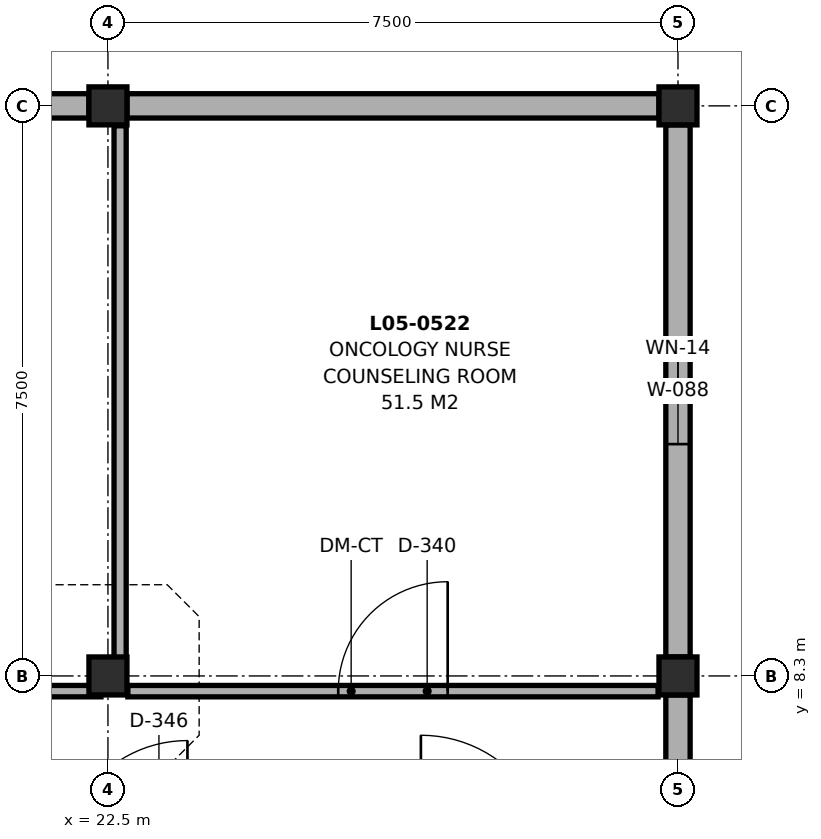
"""IFC4 building model, lengths in metres.
Left out: names, types, materials, properties, quantities, classifications, styles, units other than length and angle.
Written with IfcOpenShell. Run it as: python <this file> out.ifc"""

import sys

from ifc_helpers import new_model, si_unit, direction, frame, frame_2d, origin, origin_2d, place, context, subcontext, project, spatial, rectangle, extrude, element, fill, save


model = new_model("IFC4")
c1 = context("Model", 3, precision=1e-05, world=origin(), true_north=direction((0.0, 1.0)))
c2 = subcontext(c1, "Body", "Model", "MODEL_VIEW")
j1 = project(units=[si_unit("LENGTHUNIT", "METRE"), si_unit("PLANEANGLEUNIT", "RADIAN")], contexts=[c1])
p1 = place(None, origin())
s1 = spatial("IfcSite", under=j1, at=p1, CompositionType="ELEMENT")
p2 = place(p1, origin())
s2 = spatial("IfcBuilding", under=s1, at=p2, CompositionType="ELEMENT")
p3 = place(p2, frame((0.0, 0.0, 21.5)))
s3 = spatial("IfcBuildingStorey", under=s2, at=p3, CompositionType="ELEMENT", Elevation=21.5)
for number, where, z_axis, x_axis in (
    (1, (22.5, 8.3, 0.0), (0.0, 0.0, 1.0), (1.0, 0.0, 0.0)),
    (2, (22.5, 15.8, 0.0), (0.0, 0.0, 1.0), (1.0, 0.0, 0.0)),
):
    element("IfcColumn", number, at=place(p3, frame(where, z_axis=z_axis, x_axis=x_axis)), inside=s3, PredefinedType="COLUMN", context=c2, shape_type="SweptSolid", body=[
        extrude(rectangle(XDim=0.5, YDim=0.5, at=origin_2d()), origin(), (0.0, 0.0, 1.0), 4.58),
    ])
for number, where, z_axis, x_axis in (
    (3, (30.0, 8.3, 0.0), (0.0, 0.0, 1.0), (1.0, 0.0, 0.0)),
    (4, (30.0, 15.8, 0.0), (0.0, 0.0, 1.0), (1.0, 0.0, 0.0)),
):
    element("IfcColumn", number, at=place(p3, frame(where, z_axis=z_axis, x_axis=x_axis)), inside=s3, PredefinedType="COLUMN", context=c2, shape_type="SweptSolid", body=[
        extrude(rectangle(XDim=0.5, YDim=0.5, at=origin_2d()), origin(), (0.0, 0.0, 1.0), 4.83),
    ])
for number, where, z_axis, x_axis in (
    (5, (15.25, 15.8, 0.0), (0.0, 0.0, 1.0), (1.0, 0.0, 0.0)),
    (6, (22.75, 15.8, 0.0), (0.0, 0.0, 1.0), (1.0, 0.0, 0.0)),
):
    element("IfcWall", number, at=place(p3, frame(where, z_axis=z_axis, x_axis=x_axis)), inside=s3, PredefinedType="SOLIDWALL", context=c2, shape_type="SweptSolid", body=[
        extrude(rectangle(XDim=7.0, YDim=0.32, at=frame_2d((3.5, 0.0))), origin(), (0.0, 0.0, 1.0), 3.7),
    ])
p4 = place(p3, frame((30.0, 15.55, 0.0), z_axis=(0.0, 0.0, 1.0), x_axis=(0.0, -1.0, 0.0)))
e7 = element("IfcWall", 7, at=p4, inside=s3, PredefinedType="SOLIDWALL", context=c2, shape_type="SweptSolid", body=[
    extrude(rectangle(XDim=7.0, YDim=0.32, at=frame_2d((3.5, 0.0))), origin(), (0.0, 0.0, 1.0), 3.7),
])
p5 = place(p4, frame((2.8, 0.0, 0.9)))
e8 = element("IfcOpeningElement", 8, at=p5, cuts=e7, PredefinedType="OPENING", context=c2, shape_type="SweptSolid", body=[
    extrude(rectangle(XDim=1.4, YDim=1.5, at=frame_2d((0.7, 0.75))), frame((0.0, 0.172, 0.0), z_axis=(0.0, -1.0, 0.0), x_axis=(1.0, 0.0, 0.0)), (0.0, 0.0, 1.0), 0.344),
])
p6 = place(p3, frame((30.0, 8.05, 0.0), z_axis=(0.0, 0.0, 1.0), x_axis=(0.0, -1.0, 0.0)))
e9 = element("IfcWall", 9, at=p6, inside=s3, PredefinedType="SOLIDWALL", context=c2, shape_type="SweptSolid", body=[
    extrude(rectangle(XDim=7.0, YDim=0.32, at=frame_2d((3.5, 0.0))), origin(), (0.0, 0.0, 1.0), 3.7),
])
p7 = place(p3, frame((15.262, 8.1, 0.0), z_axis=(0.0, 0.0, 1.0), x_axis=(1.0, 0.0, 0.0)))
e10 = element("IfcWall", 10, at=p7, inside=s3, PredefinedType="PARTITIONING", context=c2, shape_type="SweptSolid", body=[
    extrude(rectangle(XDim=7.146, YDim=0.15, at=frame_2d((3.573, 0.0))), origin(), (0.0, 0.0, 1.0), 3.7),
])
p8 = place(p7, frame((2.883, 0.0, 0.0)))
e11 = element("IfcOpeningElement", 11, at=p8, cuts=e10, PredefinedType="OPENING", context=c2, shape_type="SweptSolid", body=[
    extrude(rectangle(XDim=1.38, YDim=2.3, at=frame_2d((0.69, 1.15))), frame((0.0, 0.087, 0.0), z_axis=(0.0, -1.0, 0.0), x_axis=(1.0, 0.0, 0.0)), (0.0, 0.0, 1.0), 0.174),
])
p9 = place(p3, frame((22.762, 8.1, 0.0), z_axis=(0.0, 0.0, 1.0), x_axis=(1.0, 0.0, 0.0)))
e12 = element("IfcWall", 12, at=p9, inside=s3, PredefinedType="PARTITIONING", context=c2, shape_type="SweptSolid", body=[
    extrude(rectangle(XDim=6.976, YDim=0.15, at=frame_2d((3.488, 0.0))), origin(), (0.0, 0.0, 1.0), 3.7),
])
p10 = place(p9, frame((2.768, 0.0, 0.0)))
e13 = element("IfcOpeningElement", 13, at=p10, cuts=e12, PredefinedType="OPENING", context=c2, shape_type="SweptSolid", body=[
    extrude(rectangle(XDim=1.44, YDim=2.32, at=frame_2d((0.72, 1.16))), frame((0.0, 0.087, 0.0), z_axis=(0.0, -1.0, 0.0), x_axis=(1.0, 0.0, 0.0)), (0.0, 0.0, 1.0), 0.174),
])
p11 = place(p3, frame((22.66, 8.432, 0.0), z_axis=(0.0, 0.0, 1.0), x_axis=(0.0, 1.0, 0.0)))
e14 = element("IfcWall", 14, at=p11, inside=s3, PredefinedType="PARTITIONING", context=c2, shape_type="SweptSolid", body=[
    extrude(rectangle(XDim=7.106, YDim=0.16, at=frame_2d((3.553, 0.0))), origin(), (0.0, 0.0, 1.0), 3.7),
])
p12 = place(p5, origin())
e15 = element("IfcWindow", 15, at=p12, inside=s3, PartitioningType="SINGLE_PANEL", PredefinedType="WINDOW", context=c2, shape_type="SweptSolid", body=[
    extrude(rectangle(XDim=1.4, YDim=1.5, at=frame_2d((0.7, 0.75))), frame((0.0, 0.03, 0.0), z_axis=(0.0, -1.0, 0.0), x_axis=(1.0, 0.0, 0.0)), (0.0, 0.0, 1.0), 0.06),
])
fill(e8, e15)
p13 = place(p10, origin())
e16 = element("IfcDoor", 16, at=p13, inside=s3, OperationType="SINGLE_SWING_RIGHT", PredefinedType="DOOR", context=c2, shape_type="SweptSolid", body=[
    extrude(rectangle(XDim=1.44, YDim=2.32, at=frame_2d((0.72, 1.16))), frame((0.0, 0.025, 0.0), z_axis=(0.0, -1.0, 0.0), x_axis=(1.0, 0.0, 0.0)), (0.0, 0.0, 1.0), 0.05),
])
fill(e13, e16)
save(model, sys.argv[1])
